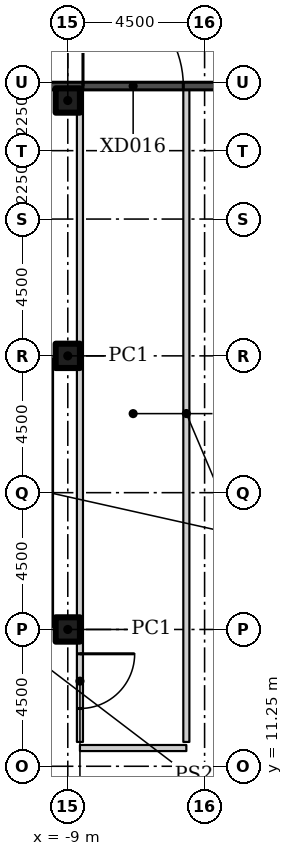
"""IFC4 building model, lengths in metres.
Left out: names, types, materials, properties, quantities, classifications, styles, units other than length and angle.
Written with IfcOpenShell. Run it as: python <this file> out.ifc"""

import sys

from ifc_helpers import new_model, si_unit, direction, frame, frame_2d, origin, origin_2d, place, context, subcontext, project, spatial, rectangle, hollow_rectangle, extrude, element, fill, save


model = new_model("IFC4")
c1 = context("Model", 3, precision=1e-05, world=origin(), true_north=direction((0.0, 1.0)))
c2 = subcontext(c1, "Body", "Model", "MODEL_VIEW")
j1 = project(units=[si_unit("LENGTHUNIT", "METRE"), si_unit("PLANEANGLEUNIT", "RADIAN")], contexts=[c1])
p1 = place(None, origin())
s1 = spatial("IfcSite", under=j1, at=p1, CompositionType="ELEMENT")
p2 = place(p1, origin())
s2 = spatial("IfcBuilding", under=s1, at=p2, CompositionType="ELEMENT")
p3 = place(p2, origin())
s3 = spatial("IfcBuildingStorey", under=s2, at=p3, CompositionType="ELEMENT", Elevation=0.0)
for number, where in (
    (1, (-9.0, 15.75, 0.0)),
    (2, (-9.0, 24.75, 0.0)),
    (3, (-9.0, 33.15, 0.0)),
):
    element("IfcColumn", number, at=place(p3, frame(where)), inside=s3, PredefinedType="COLUMN", context=c2, shape_type="SweptSolid", body=[
        extrude(hollow_rectangle(XDim=0.8, YDim=0.8, WallThickness=0.03, at=origin_2d()), origin(), (0.0, 0.0, 1.0), 6.1),
    ])
p4 = place(p3, frame((-8.6, 11.85, 0.0)))
e4 = element("IfcWall", 4, at=p4, inside=s3, PredefinedType="PARTITIONING", context=c2, shape_type="SweptSolid", body=[
    extrude(rectangle(XDim=3.5, YDim=0.2, at=frame_2d((1.75, 0.0))), origin(), (0.0, 0.0, 1.0), 6.1),
])
p5 = place(p3, frame((-8.6, 33.655, 0.0), z_axis=(0.0, 0.0, 1.0), x_axis=(0.0, -1.0, 0.0)))
e5 = element("IfcWall", 5, at=p5, inside=s3, PredefinedType="PARTITIONING", context=c2, shape_type="SweptSolid", body=[
    extrude(rectangle(XDim=21.605, YDim=0.2, at=frame_2d((10.802, 0.0))), origin(), (0.0, 0.0, 1.0), 6.1),
])
p6 = place(p5, frame((18.705, 0.0, 0.0)))
e6 = element("IfcOpeningElement", 6, at=p6, cuts=e5, PredefinedType="OPENING", context=c2, shape_type="SweptSolid", body=[
    extrude(rectangle(XDim=1.8, YDim=2.1, at=frame_2d((0.9, 1.05))), frame((0.0, 0.11, 0.0), z_axis=(0.0, -1.0, 0.0), x_axis=(1.0, 0.0, 0.0)), (0.0, 0.0, 1.0), 0.22),
])
p7 = place(p3, frame((-5.1, 12.05, 0.0), z_axis=(0.0, 0.0, 1.0), x_axis=(0.0, 1.0, 0.0)))
e7 = element("IfcWall", 7, at=p7, inside=s3, PredefinedType="PARTITIONING", context=c2, shape_type="SweptSolid", body=[
    extrude(rectangle(XDim=21.605, YDim=0.2, at=frame_2d((10.802, 0.0))), origin(), (0.0, 0.0, 1.0), 6.1),
])
p8 = place(p3, frame((-67.5, 33.625, 0.0)))
e8 = element("IfcWall", 8, at=p8, inside=s3, PredefinedType="SOLIDWALL", context=c2, shape_type="SweptSolid", body=[
    extrude(rectangle(XDim=130.5, YDim=0.25, at=frame_2d((65.25, 0.0))), origin(), (0.0, 0.0, 1.0), 6.15),
])
p9 = place(p8, frame((28.65, 0.0, 0.0)))
e9 = element("IfcOpeningElement", 9, at=p9, cuts=e8, PredefinedType="OPENING", context=c2, shape_type="SweptSolid", body=[
    extrude(rectangle(XDim=1.2, YDim=2.4, at=frame_2d((0.6, 1.2))), frame((0.0, 0.135, 0.0), z_axis=(0.0, -1.0, 0.0), x_axis=(1.0, 0.0, 0.0)), (0.0, 0.0, 1.0), 0.27),
])
p10 = place(p8, frame((37.25, 0.0, 0.0)))
e10 = element("IfcOpeningElement", 10, at=p10, cuts=e8, PredefinedType="OPENING", context=c2, shape_type="SweptSolid", body=[
    extrude(rectangle(XDim=2.0, YDim=2.4, at=frame_2d((1.0, 1.2))), frame((0.0, 0.135, 0.0), z_axis=(0.0, -1.0, 0.0), x_axis=(1.0, 0.0, 0.0)), (0.0, 0.0, 1.0), 0.27),
])
p11 = place(p8, frame((100.25, 0.0, 0.0)))
e11 = element("IfcOpeningElement", 11, at=p11, cuts=e8, PredefinedType="OPENING", context=c2, shape_type="SweptSolid", body=[
    extrude(rectangle(XDim=2.0, YDim=2.4, at=frame_2d((1.0, 1.2))), frame((0.0, 0.135, 0.0), z_axis=(0.0, -1.0, 0.0), x_axis=(1.0, 0.0, 0.0)), (0.0, 0.0, 1.0), 0.27),
])
p12 = place(p8, frame((55.25, 0.0, 0.0)))
e12 = element("IfcOpeningElement", 12, at=p12, cuts=e8, PredefinedType="OPENING", context=c2, shape_type="SweptSolid", body=[
    extrude(rectangle(XDim=2.0, YDim=2.4, at=frame_2d((1.0, 1.2))), frame((0.0, 0.135, 0.0), z_axis=(0.0, -1.0, 0.0), x_axis=(1.0, 0.0, 0.0)), (0.0, 0.0, 1.0), 0.27),
])
p13 = place(p8, frame((68.75, 0.0, 0.0)))
e13 = element("IfcOpeningElement", 13, at=p13, cuts=e8, PredefinedType="OPENING", context=c2, shape_type="SweptSolid", body=[
    extrude(rectangle(XDim=2.0, YDim=2.4, at=frame_2d((1.0, 1.2))), frame((0.0, 0.135, 0.0), z_axis=(0.0, -1.0, 0.0), x_axis=(1.0, 0.0, 0.0)), (0.0, 0.0, 1.0), 0.27),
])
p14 = place(p8, frame((10.25, 0.0, 0.0)))
e14 = element("IfcOpeningElement", 14, at=p14, cuts=e8, PredefinedType="OPENING", context=c2, shape_type="SweptSolid", body=[
    extrude(rectangle(XDim=2.0, YDim=2.4, at=frame_2d((1.0, 1.2))), frame((0.0, 0.135, 0.0), z_axis=(0.0, -1.0, 0.0), x_axis=(1.0, 0.0, 0.0)), (0.0, 0.0, 1.0), 0.27),
])
p15 = place(p8, frame((5.65, 0.0, 0.0)))
e15 = element("IfcOpeningElement", 15, at=p15, cuts=e8, PredefinedType="OPENING", context=c2, shape_type="SweptSolid", body=[
    extrude(rectangle(XDim=2.2, YDim=2.4, at=frame_2d((1.1, 1.2))), frame((0.0, 0.135, 0.0), z_axis=(0.0, -1.0, 0.0), x_axis=(1.0, 0.0, 0.0)), (0.0, 0.0, 1.0), 0.27),
])
p16 = place(p8, frame((113.65, 0.0, 0.0)))
e16 = element("IfcOpeningElement", 16, at=p16, cuts=e8, PredefinedType="OPENING", context=c2, shape_type="SweptSolid", body=[
    extrude(rectangle(XDim=2.2, YDim=2.4, at=frame_2d((1.1, 1.2))), frame((0.0, 0.135, 0.0), z_axis=(0.0, -1.0, 0.0), x_axis=(1.0, 0.0, 0.0)), (0.0, 0.0, 1.0), 0.27),
])
p17 = place(p8, frame((45.45, 0.0, 0.0)))
e17 = element("IfcOpeningElement", 17, at=p17, cuts=e8, PredefinedType="OPENING", context=c2, shape_type="SweptSolid", body=[
    extrude(rectangle(XDim=3.6, YDim=4.5, at=frame_2d((1.8, 2.25))), frame((0.0, 0.135, 0.0), z_axis=(0.0, -1.0, 0.0), x_axis=(1.0, 0.0, 0.0)), (0.0, 0.0, 1.0), 0.27),
])
p18 = place(p8, frame((91.15, 0.0, 0.0)))
e18 = element("IfcOpeningElement", 18, at=p18, cuts=e8, PredefinedType="OPENING", context=c2, shape_type="SweptSolid", body=[
    extrude(rectangle(XDim=2.2, YDim=2.4, at=frame_2d((1.1, 1.2))), frame((0.0, 0.135, 0.0), z_axis=(0.0, -1.0, 0.0), x_axis=(1.0, 0.0, 0.0)), (0.0, 0.0, 1.0), 0.27),
])
p19 = place(p8, frame((23.0, 0.0, 0.0)))
e19 = element("IfcOpeningElement", 19, at=p19, cuts=e8, PredefinedType="OPENING", context=c2, shape_type="SweptSolid", body=[
    extrude(rectangle(XDim=3.3, YDim=2.4, at=frame_2d((1.65, 1.2))), frame((0.0, 0.135, 0.0), z_axis=(0.0, -1.0, 0.0), x_axis=(1.0, 0.0, 0.0)), (0.0, 0.0, 1.0), 0.27),
])
p20 = place(p8, frame((59.0, 0.0, 0.0)))
e20 = element("IfcOpeningElement", 20, at=p20, cuts=e8, PredefinedType="OPENING", context=c2, shape_type="SweptSolid", body=[
    extrude(rectangle(XDim=3.3, YDim=2.4, at=frame_2d((1.65, 1.2))), frame((0.0, 0.135, 0.0), z_axis=(0.0, -1.0, 0.0), x_axis=(1.0, 0.0, 0.0)), (0.0, 0.0, 1.0), 0.27),
])
p21 = place(p8, frame((86.0, 0.0, 0.0)))
e21 = element("IfcOpeningElement", 21, at=p21, cuts=e8, PredefinedType="OPENING", context=c2, shape_type="SweptSolid", body=[
    extrude(rectangle(XDim=3.3, YDim=2.4, at=frame_2d((1.65, 1.2))), frame((0.0, 0.135, 0.0), z_axis=(0.0, -1.0, 0.0), x_axis=(1.0, 0.0, 0.0)), (0.0, 0.0, 1.0), 0.27),
])
p22 = place(p8, frame((122.0, 0.0, 0.0)))
e22 = element("IfcOpeningElement", 22, at=p22, cuts=e8, PredefinedType="OPENING", context=c2, shape_type="SweptSolid", body=[
    extrude(rectangle(XDim=3.3, YDim=2.4, at=frame_2d((1.65, 1.2))), frame((0.0, 0.135, 0.0), z_axis=(0.0, -1.0, 0.0), x_axis=(1.0, 0.0, 0.0)), (0.0, 0.0, 1.0), 0.27),
])
p23 = place(p8, frame((127.05, 0.0, 3.0)))
e23 = element("IfcOpeningElement", 23, at=p23, cuts=e8, PredefinedType="OPENING", context=c2, shape_type="SweptSolid", body=[
    extrude(rectangle(XDim=2.4, YDim=1.2, at=frame_2d((1.2, 0.6))), frame((0.0, 0.135, 0.0), z_axis=(0.0, -1.0, 0.0), x_axis=(1.0, 0.0, 0.0)), (0.0, 0.0, 1.0), 0.27),
])
p24 = place(p8, frame((118.05, 0.0, 3.0)))
e24 = element("IfcOpeningElement", 24, at=p24, cuts=e8, PredefinedType="OPENING", context=c2, shape_type="SweptSolid", body=[
    extrude(rectangle(XDim=2.4, YDim=1.2, at=frame_2d((1.2, 0.6))), frame((0.0, 0.135, 0.0), z_axis=(0.0, -1.0, 0.0), x_axis=(1.0, 0.0, 0.0)), (0.0, 0.0, 1.0), 0.27),
])
p25 = place(p8, frame((109.05, 0.0, 3.0)))
e25 = element("IfcOpeningElement", 25, at=p25, cuts=e8, PredefinedType="OPENING", context=c2, shape_type="SweptSolid", body=[
    extrude(rectangle(XDim=2.4, YDim=1.2, at=frame_2d((1.2, 0.6))), frame((0.0, 0.135, 0.0), z_axis=(0.0, -1.0, 0.0), x_axis=(1.0, 0.0, 0.0)), (0.0, 0.0, 1.0), 0.27),
])
p26 = place(p8, frame((104.55, 0.0, 3.0)))
e26 = element("IfcOpeningElement", 26, at=p26, cuts=e8, PredefinedType="OPENING", context=c2, shape_type="SweptSolid", body=[
    extrude(rectangle(XDim=2.4, YDim=1.2, at=frame_2d((1.2, 0.6))), frame((0.0, 0.135, 0.0), z_axis=(0.0, -1.0, 0.0), x_axis=(1.0, 0.0, 0.0)), (0.0, 0.0, 1.0), 0.27),
])
p27 = place(p8, frame((95.55, 0.0, 3.0)))
e27 = element("IfcOpeningElement", 27, at=p27, cuts=e8, PredefinedType="OPENING", context=c2, shape_type="SweptSolid", body=[
    extrude(rectangle(XDim=2.4, YDim=1.2, at=frame_2d((1.2, 0.6))), frame((0.0, 0.135, 0.0), z_axis=(0.0, -1.0, 0.0), x_axis=(1.0, 0.0, 0.0)), (0.0, 0.0, 1.0), 0.27),
])
p28 = place(p8, frame((82.05, 0.0, 3.0)))
e28 = element("IfcOpeningElement", 28, at=p28, cuts=e8, PredefinedType="OPENING", context=c2, shape_type="SweptSolid", body=[
    extrude(rectangle(XDim=2.4, YDim=1.2, at=frame_2d((1.2, 0.6))), frame((0.0, 0.135, 0.0), z_axis=(0.0, -1.0, 0.0), x_axis=(1.0, 0.0, 0.0)), (0.0, 0.0, 1.0), 0.27),
])
p29 = place(p8, frame((77.55, 0.0, 3.0)))
e29 = element("IfcOpeningElement", 29, at=p29, cuts=e8, PredefinedType="OPENING", context=c2, shape_type="SweptSolid", body=[
    extrude(rectangle(XDim=2.4, YDim=1.2, at=frame_2d((1.2, 0.6))), frame((0.0, 0.135, 0.0), z_axis=(0.0, -1.0, 0.0), x_axis=(1.0, 0.0, 0.0)), (0.0, 0.0, 1.0), 0.27),
])
p30 = place(p8, frame((73.05, 0.0, 3.0)))
e30 = element("IfcOpeningElement", 30, at=p30, cuts=e8, PredefinedType="OPENING", context=c2, shape_type="SweptSolid", body=[
    extrude(rectangle(XDim=2.4, YDim=1.2, at=frame_2d((1.2, 0.6))), frame((0.0, 0.135, 0.0), z_axis=(0.0, -1.0, 0.0), x_axis=(1.0, 0.0, 0.0)), (0.0, 0.0, 1.0), 0.27),
])
p31 = place(p8, frame((64.05, 0.0, 3.0)))
e31 = element("IfcOpeningElement", 31, at=p31, cuts=e8, PredefinedType="OPENING", context=c2, shape_type="SweptSolid", body=[
    extrude(rectangle(XDim=2.4, YDim=1.2, at=frame_2d((1.2, 0.6))), frame((0.0, 0.135, 0.0), z_axis=(0.0, -1.0, 0.0), x_axis=(1.0, 0.0, 0.0)), (0.0, 0.0, 1.0), 0.27),
])
p32 = place(p8, frame((50.55, 0.0, 3.0)))
e32 = element("IfcOpeningElement", 32, at=p32, cuts=e8, PredefinedType="OPENING", context=c2, shape_type="SweptSolid", body=[
    extrude(rectangle(XDim=2.4, YDim=1.2, at=frame_2d((1.2, 0.6))), frame((0.0, 0.135, 0.0), z_axis=(0.0, -1.0, 0.0), x_axis=(1.0, 0.0, 0.0)), (0.0, 0.0, 1.0), 0.27),
])
p33 = place(p8, frame((41.55, 0.0, 3.0)))
e33 = element("IfcOpeningElement", 33, at=p33, cuts=e8, PredefinedType="OPENING", context=c2, shape_type="SweptSolid", body=[
    extrude(rectangle(XDim=2.4, YDim=1.2, at=frame_2d((1.2, 0.6))), frame((0.0, 0.135, 0.0), z_axis=(0.0, -1.0, 0.0), x_axis=(1.0, 0.0, 0.0)), (0.0, 0.0, 1.0), 0.27),
])
p34 = place(p8, frame((32.55, 0.0, 3.0)))
e34 = element("IfcOpeningElement", 34, at=p34, cuts=e8, PredefinedType="OPENING", context=c2, shape_type="SweptSolid", body=[
    extrude(rectangle(XDim=2.4, YDim=1.2, at=frame_2d((1.2, 0.6))), frame((0.0, 0.135, 0.0), z_axis=(0.0, -1.0, 0.0), x_axis=(1.0, 0.0, 0.0)), (0.0, 0.0, 1.0), 0.27),
])
p35 = place(p8, frame((19.05, 0.0, 3.0)))
e35 = element("IfcOpeningElement", 35, at=p35, cuts=e8, PredefinedType="OPENING", context=c2, shape_type="SweptSolid", body=[
    extrude(rectangle(XDim=2.4, YDim=1.2, at=frame_2d((1.2, 0.6))), frame((0.0, 0.135, 0.0), z_axis=(0.0, -1.0, 0.0), x_axis=(1.0, 0.0, 0.0)), (0.0, 0.0, 1.0), 0.27),
])
p36 = place(p8, frame((14.55, 0.0, 3.0)))
e36 = element("IfcOpeningElement", 36, at=p36, cuts=e8, PredefinedType="OPENING", context=c2, shape_type="SweptSolid", body=[
    extrude(rectangle(XDim=2.4, YDim=1.2, at=frame_2d((1.2, 0.6))), frame((0.0, 0.135, 0.0), z_axis=(0.0, -1.0, 0.0), x_axis=(1.0, 0.0, 0.0)), (0.0, 0.0, 1.0), 0.27),
])
p37 = place(p8, frame((1.05, 0.0, 3.0)))
e37 = element("IfcOpeningElement", 37, at=p37, cuts=e8, PredefinedType="OPENING", context=c2, shape_type="SweptSolid", body=[
    extrude(rectangle(XDim=2.4, YDim=1.2, at=frame_2d((1.2, 0.6))), frame((0.0, 0.135, 0.0), z_axis=(0.0, -1.0, 0.0), x_axis=(1.0, 0.0, 0.0)), (0.0, 0.0, 1.0), 0.27),
])
p38 = place(p6, origin())
e38 = element("IfcDoor", 38, at=p38, inside=s3, OperationType="DOUBLE_DOOR_SINGLE_SWING", PredefinedType="DOOR", context=c2, shape_type="SweptSolid", body=[
    extrude(rectangle(XDim=1.8, YDim=2.1, at=frame_2d((0.9, 1.05))), frame((0.0, 0.025, 0.0), z_axis=(0.0, -1.0, 0.0), x_axis=(1.0, 0.0, 0.0)), (0.0, 0.0, 1.0), 0.05),
])
fill(e6, e38)
p39 = place(p20, origin())
e39 = element("IfcDoor", 39, at=p39, inside=s3, OperationType="DOUBLE_DOOR_SINGLE_SWING", PredefinedType="DOOR", context=c2, shape_type="SweptSolid", body=[
    extrude(rectangle(XDim=3.3, YDim=2.4, at=frame_2d((1.65, 1.2))), frame((0.0, 0.025, 0.0), z_axis=(0.0, -1.0, 0.0), x_axis=(1.0, 0.0, 0.0)), (0.0, 0.0, 1.0), 0.05),
])
fill(e20, e39)
save(model, sys.argv[1])
